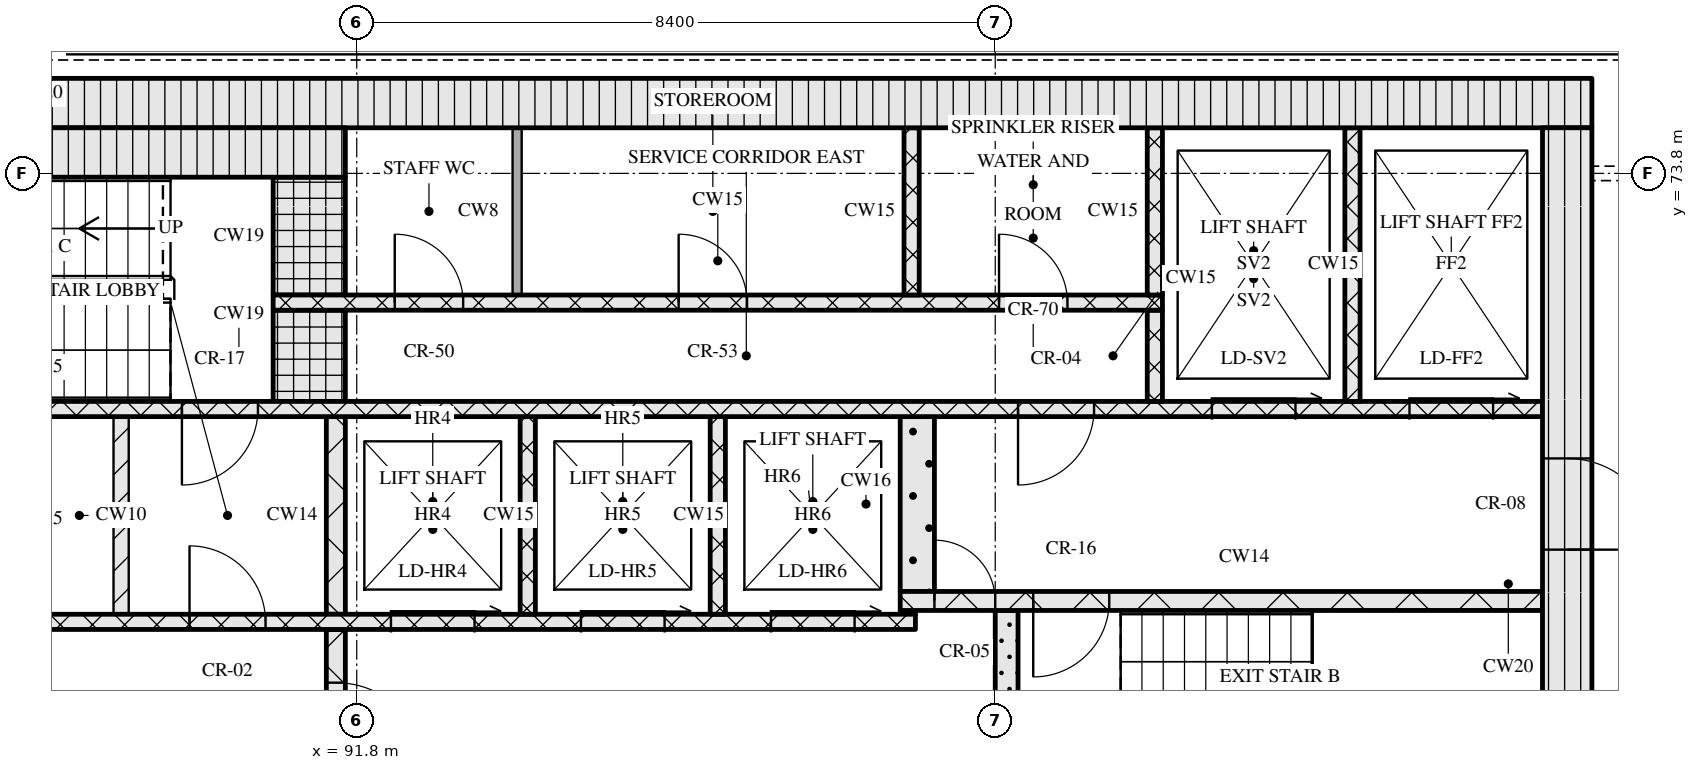
"""IFC4 building model, lengths in metres.
Left out: names, types, materials, properties, quantities, classifications, styles, units other than length and angle.
Written with IfcOpenShell. Run it as: python <this file> out.ifc"""

import sys

from ifc_helpers import new_model, si_unit, direction, frame, frame_2d, origin, place, context, subcontext, project, spatial, rectangle, extrude, element, fill, save


model = new_model("IFC4")
c1 = context("Model", 3, precision=1e-05, world=origin(), true_north=direction((0.0, 1.0)))
c2 = subcontext(c1, "Body", "Model", "MODEL_VIEW")
j1 = project(units=[si_unit("LENGTHUNIT", "METRE"), si_unit("PLANEANGLEUNIT", "RADIAN")], contexts=[c1])
p1 = place(None, origin())
s1 = spatial("IfcSite", under=j1, at=p1, CompositionType="ELEMENT")
p2 = place(p1, origin())
s2 = spatial("IfcBuilding", under=s1, at=p2, CompositionType="ELEMENT")
p3 = place(p2, frame((0.0, 0.0, 216.3)))
s3 = spatial("IfcBuildingStorey", under=s2, at=p3, CompositionType="ELEMENT", Elevation=216.3)
p4 = place(p3, frame((67.15, 74.725, 0.0), z_axis=(0.0, 0.0, 1.0), x_axis=(1.0, 0.0, 0.0)))
e1 = element("IfcWall", 1, at=p4, inside=s3, PredefinedType="SOLIDWALL", context=c2, shape_type="SweptSolid", body=[
    extrude(rectangle(XDim=40.9, YDim=0.65, at=frame_2d((20.45, 0.0))), origin(), (0.0, 0.0, 1.0), 3.32),
])
p5 = place(p3, frame((107.725, 62.4, 0.0), z_axis=(0.0, 0.0, 1.0), x_axis=(0.0, 1.0, 0.0)))
e2 = element("IfcWall", 2, at=p5, inside=s3, PredefinedType="SOLIDWALL", context=c2, shape_type="SweptSolid", body=[
    extrude(rectangle(XDim=12.0, YDim=0.65, at=frame_2d((6.0, 0.0))), origin(), (0.0, 0.0, 1.0), 3.32),
])
p6 = place(p5, frame((6.45, 0.0, 0.0)))
e3 = element("IfcOpeningElement", 3, at=p6, cuts=e2, PredefinedType="OPENING", context=c2, shape_type="SweptSolid", body=[
    extrude(rectangle(XDim=1.2, YDim=2.1, at=frame_2d((0.6, 1.05))), frame((0.0, 0.335, 0.0), z_axis=(0.0, -1.0, 0.0), x_axis=(1.0, 0.0, 0.0)), (0.0, 0.0, 1.0), 0.67),
])
p7 = place(p3, frame((91.525, 65.2, 0.0), z_axis=(0.0, 0.0, 1.0), x_axis=(0.0, 1.0, 0.0)))
e4 = element("IfcWall", 4, at=p7, inside=s3, PredefinedType="SOLIDWALL", context=c2, shape_type="SweptSolid", body=[
    extrude(rectangle(XDim=2.6, YDim=0.25, at=frame_2d((1.3, 0.0))), origin(), (0.0, 0.0, 1.0), 3.32),
])
p8 = place(p7, frame((0.7, 0.0, 0.0)))
e5 = element("IfcOpeningElement", 5, at=p8, cuts=e4, PredefinedType="OPENING", context=c2, shape_type="SweptSolid", body=[
    extrude(rectangle(XDim=1.2, YDim=2.1, at=frame_2d((0.6, 1.05))), frame((0.0, 0.135, 0.0), z_axis=(0.0, -1.0, 0.0), x_axis=(1.0, 0.0, 0.0)), (0.0, 0.0, 1.0), 0.27),
])
p9 = place(p3, frame((100.35, 65.2, 0.0), z_axis=(0.0, 0.0, 1.0), x_axis=(0.0, 1.0, 0.0)))
e6 = element("IfcWall", 6, at=p9, inside=s3, PredefinedType="SOLIDWALL", context=c2, shape_type="SweptSolid", body=[
    extrude(rectangle(XDim=2.85, YDim=0.3, at=frame_2d((1.425, 0.0))), origin(), (0.0, 0.0, 1.0), 3.32),
])
p10 = place(p3, frame((76.05, 67.9, 0.0), z_axis=(0.0, 0.0, 1.0), x_axis=(1.0, 0.0, 0.0)))
e7 = element("IfcWall", 7, at=p10, inside=s3, PredefinedType="SOLIDWALL", context=c2, shape_type="SweptSolid", body=[
    extrude(rectangle(XDim=23.1, YDim=0.2, at=frame_2d((11.55, 0.0))), origin(), (0.0, 0.0, 1.0), 3.32),
])
p11 = place(p10, frame((3.2, 0.0, 0.0)))
e8 = element("IfcOpeningElement", 8, at=p11, cuts=e7, PredefinedType="OPENING", context=c2, shape_type="SweptSolid", body=[
    extrude(rectangle(XDim=0.9, YDim=2.1, at=frame_2d((0.45, 1.05))), frame((0.0, 0.11, 0.0), z_axis=(0.0, -1.0, 0.0), x_axis=(1.0, 0.0, 0.0)), (0.0, 0.0, 1.0), 0.22),
])
p12 = place(p10, frame((9.7, 0.0, 0.0)))
e9 = element("IfcOpeningElement", 9, at=p12, cuts=e7, PredefinedType="OPENING", context=c2, shape_type="SweptSolid", body=[
    extrude(rectangle(XDim=0.9, YDim=2.1, at=frame_2d((0.45, 1.05))), frame((0.0, 0.11, 0.0), z_axis=(0.0, -1.0, 0.0), x_axis=(1.0, 0.0, 0.0)), (0.0, 0.0, 1.0), 0.22),
])
p13 = place(p10, frame((13.55, 0.0, 0.0)))
e10 = element("IfcOpeningElement", 10, at=p13, cuts=e7, PredefinedType="OPENING", context=c2, shape_type="SweptSolid", body=[
    extrude(rectangle(XDim=1.0, YDim=2.1, at=frame_2d((0.5, 1.05))), frame((0.0, 0.11, 0.0), z_axis=(0.0, -1.0, 0.0), x_axis=(1.0, 0.0, 0.0)), (0.0, 0.0, 1.0), 0.22),
])
p14 = place(p10, frame((16.2, 0.0, 0.0)))
e11 = element("IfcOpeningElement", 11, at=p14, cuts=e7, PredefinedType="OPENING", context=c2, shape_type="SweptSolid", body=[
    extrude(rectangle(XDim=1.1, YDim=2.1, at=frame_2d((0.55, 1.05))), frame((0.0, 0.11, 0.0), z_axis=(0.0, -1.0, 0.0), x_axis=(1.0, 0.0, 0.0)), (0.0, 0.0, 1.0), 0.22),
])
p15 = place(p10, frame((18.7, 0.0, 0.0)))
e12 = element("IfcOpeningElement", 12, at=p15, cuts=e7, PredefinedType="OPENING", context=c2, shape_type="SweptSolid", body=[
    extrude(rectangle(XDim=1.1, YDim=2.1, at=frame_2d((0.55, 1.05))), frame((0.0, 0.11, 0.0), z_axis=(0.0, -1.0, 0.0), x_axis=(1.0, 0.0, 0.0)), (0.0, 0.0, 1.0), 0.22),
])
p16 = place(p10, frame((21.2, 0.0, 0.0)))
e13 = element("IfcOpeningElement", 13, at=p16, cuts=e7, PredefinedType="OPENING", context=c2, shape_type="SweptSolid", body=[
    extrude(rectangle(XDim=1.1, YDim=2.1, at=frame_2d((0.55, 1.05))), frame((0.0, 0.11, 0.0), z_axis=(0.0, -1.0, 0.0), x_axis=(1.0, 0.0, 0.0)), (0.0, 0.0, 1.0), 0.22),
])
p17 = place(p3, frame((88.7, 68.0, 0.0), z_axis=(0.0, 0.0, 1.0), x_axis=(0.0, 1.0, 0.0)))
e14 = element("IfcWall", 14, at=p17, inside=s3, PredefinedType="PARTITIONING", context=c2, shape_type="SweptSolid", body=[
    extrude(rectangle(XDim=2.6, YDim=0.2, at=frame_2d((1.3, 0.0))), origin(), (0.0, 0.0, 1.0), 3.32),
])
p18 = place(p3, frame((91.525, 68.0, 0.0), z_axis=(0.0, 0.0, 1.0), x_axis=(0.0, 1.0, 0.0)))
e15 = element("IfcWall", 15, at=p18, inside=s3, PredefinedType="SOLIDWALL", context=c2, shape_type="SweptSolid", body=[
    extrude(rectangle(XDim=2.6, YDim=0.25, at=frame_2d((1.3, 0.0))), origin(), (0.0, 0.0, 1.0), 3.32),
])
for number, where, z_axis, x_axis in (
    (16, (94.05, 68.0, 0.0), (0.0, 0.0, 1.0), (0.0, 1.0, 0.0)),
    (17, (96.55, 68.0, 0.0), (0.0, 0.0, 1.0), (0.0, 1.0, 0.0)),
):
    element("IfcWall", number, at=place(p3, frame(where, z_axis=z_axis, x_axis=x_axis)), inside=s3, PredefinedType="SOLIDWALL", context=c2, shape_type="SweptSolid", body=[
        extrude(rectangle(XDim=2.6, YDim=0.2, at=frame_2d((1.3, 0.0))), origin(), (0.0, 0.0, 1.0), 3.32),
    ])
p19 = place(p3, frame((98.95, 68.025, 0.0), z_axis=(0.0, 0.0, 1.0), x_axis=(1.0, 0.0, 0.0)))
e18 = element("IfcWall", 18, at=p19, inside=s3, PredefinedType="SOLIDWALL", context=c2, shape_type="SweptSolid", body=[
    extrude(rectangle(XDim=0.2, YDim=0.05, at=frame_2d((0.1, 0.0))), origin(), (0.0, 0.0, 1.0), 3.32),
])
p20 = place(p3, frame((98.95, 68.175, 0.0), z_axis=(0.0, 0.0, 1.0), x_axis=(1.0, 0.0, 0.0)))
e19 = element("IfcWall", 19, at=p20, inside=s3, PredefinedType="SOLIDWALL", context=c2, shape_type="SweptSolid", body=[
    extrude(rectangle(XDim=8.45, YDim=0.25, at=frame_2d((4.225, 0.0))), origin(), (0.0, 0.0, 1.0), 3.32),
])
p21 = place(p20, frame((0.45, 0.0, 0.0)))
e20 = element("IfcOpeningElement", 20, at=p21, cuts=e19, PredefinedType="OPENING", context=c2, shape_type="SweptSolid", body=[
    extrude(rectangle(XDim=0.8, YDim=2.1, at=frame_2d((0.4, 1.05))), frame((0.0, 0.135, 0.0), z_axis=(0.0, -1.0, 0.0), x_axis=(1.0, 0.0, 0.0)), (0.0, 0.0, 1.0), 0.27),
])
p22 = place(p20, frame((1.75, 0.0, 0.0)))
e21 = element("IfcOpeningElement", 21, at=p22, cuts=e19, PredefinedType="OPENING", context=c2, shape_type="SweptSolid", body=[
    extrude(rectangle(XDim=1.0, YDim=2.1, at=frame_2d((0.5, 1.05))), frame((0.0, 0.135, 0.0), z_axis=(0.0, -1.0, 0.0), x_axis=(1.0, 0.0, 0.0)), (0.0, 0.0, 1.0), 0.27),
])
p23 = place(p3, frame((99.175, 68.3, 0.0), z_axis=(0.0, 0.0, 1.0), x_axis=(0.0, 1.0, 0.0)))
e22 = element("IfcWall", 22, at=p23, inside=s3, PredefinedType="SOLIDWALL", context=c2, shape_type="SweptSolid", body=[
    extrude(rectangle(XDim=2.3, YDim=0.45, at=frame_2d((1.15, 0.0))), origin(), (0.0, 0.0, 1.0), 3.32),
])
p24 = place(p3, frame((67.8, 70.7, 0.0), z_axis=(0.0, 0.0, 1.0), x_axis=(1.0, 0.0, 0.0)))
e23 = element("IfcWall", 23, at=p24, inside=s3, PredefinedType="SOLIDWALL", context=c2, shape_type="SweptSolid", body=[
    extrude(rectangle(XDim=39.6, YDim=0.2, at=frame_2d((19.8, 0.0))), origin(), (0.0, 0.0, 1.0), 3.32),
])
p25 = place(p24, frame((0.65, 0.0, 0.0)))
e24 = element("IfcOpeningElement", 24, at=p25, cuts=e23, PredefinedType="OPENING", context=c2, shape_type="SweptSolid", body=[
    extrude(rectangle(XDim=1.1, YDim=2.1, at=frame_2d((0.55, 1.05))), frame((0.0, 0.11, 0.0), z_axis=(0.0, -1.0, 0.0), x_axis=(1.0, 0.0, 0.0)), (0.0, 0.0, 1.0), 0.22),
])
p26 = place(p24, frame((3.25, 0.0, 0.0)))
e25 = element("IfcOpeningElement", 25, at=p26, cuts=e23, PredefinedType="OPENING", context=c2, shape_type="SweptSolid", body=[
    extrude(rectangle(XDim=1.1, YDim=2.1, at=frame_2d((0.55, 1.05))), frame((0.0, 0.11, 0.0), z_axis=(0.0, -1.0, 0.0), x_axis=(1.0, 0.0, 0.0)), (0.0, 0.0, 1.0), 0.22),
])
p27 = place(p24, frame((5.9, 0.0, 0.0)))
e26 = element("IfcOpeningElement", 26, at=p27, cuts=e23, PredefinedType="OPENING", context=c2, shape_type="SweptSolid", body=[
    extrude(rectangle(XDim=1.0, YDim=2.1, at=frame_2d((0.5, 1.05))), frame((0.0, 0.11, 0.0), z_axis=(0.0, -1.0, 0.0), x_axis=(1.0, 0.0, 0.0)), (0.0, 0.0, 1.0), 0.22),
])
p28 = place(p24, frame((21.7, 0.0, 0.0)))
e27 = element("IfcOpeningElement", 27, at=p28, cuts=e23, PredefinedType="OPENING", context=c2, shape_type="SweptSolid", body=[
    extrude(rectangle(XDim=1.0, YDim=2.1, at=frame_2d((0.5, 1.05))), frame((0.0, 0.11, 0.0), z_axis=(0.0, -1.0, 0.0), x_axis=(1.0, 0.0, 0.0)), (0.0, 0.0, 1.0), 0.22),
])
p29 = place(p24, frame((32.7, 0.0, 0.0)))
e28 = element("IfcOpeningElement", 28, at=p29, cuts=e23, PredefinedType="OPENING", context=c2, shape_type="SweptSolid", body=[
    extrude(rectangle(XDim=1.0, YDim=2.1, at=frame_2d((0.5, 1.05))), frame((0.0, 0.11, 0.0), z_axis=(0.0, -1.0, 0.0), x_axis=(1.0, 0.0, 0.0)), (0.0, 0.0, 1.0), 0.22),
])
p30 = place(p24, frame((35.25, 0.0, 0.0)))
e29 = element("IfcOpeningElement", 29, at=p30, cuts=e23, PredefinedType="OPENING", context=c2, shape_type="SweptSolid", body=[
    extrude(rectangle(XDim=1.1, YDim=2.1, at=frame_2d((0.55, 1.05))), frame((0.0, 0.11, 0.0), z_axis=(0.0, -1.0, 0.0), x_axis=(1.0, 0.0, 0.0)), (0.0, 0.0, 1.0), 0.22),
])
p31 = place(p24, frame((37.85, 0.0, 0.0)))
e30 = element("IfcOpeningElement", 30, at=p31, cuts=e23, PredefinedType="OPENING", context=c2, shape_type="SweptSolid", body=[
    extrude(rectangle(XDim=1.1, YDim=2.1, at=frame_2d((0.55, 1.05))), frame((0.0, 0.11, 0.0), z_axis=(0.0, -1.0, 0.0), x_axis=(1.0, 0.0, 0.0)), (0.0, 0.0, 1.0), 0.22),
])
p32 = place(p3, frame((91.175, 70.8, 0.0), z_axis=(0.0, 0.0, 1.0), x_axis=(0.0, 1.0, 0.0)))
e31 = element("IfcWall", 31, at=p32, inside=s3, PredefinedType="SOLIDWALL", context=c2, shape_type="SweptSolid", body=[
    extrude(rectangle(XDim=1.2, YDim=0.95, at=frame_2d((0.6, 0.0))), origin(), (0.0, 0.0, 1.0), 3.32),
])
p33 = place(p3, frame((102.3, 70.8, 0.0), z_axis=(0.0, 0.0, 1.0), x_axis=(0.0, 1.0, 0.0)))
e32 = element("IfcWall", 32, at=p33, inside=s3, PredefinedType="SOLIDWALL", context=c2, shape_type="SweptSolid", body=[
    extrude(rectangle(XDim=1.2, YDim=0.2, at=frame_2d((0.6, 0.0))), origin(), (0.0, 0.0, 1.0), 3.32),
])
p34 = place(p3, frame((104.9, 70.8, 0.0), z_axis=(0.0, 0.0, 1.0), x_axis=(0.0, 1.0, 0.0)))
e33 = element("IfcWall", 33, at=p34, inside=s3, PredefinedType="SOLIDWALL", context=c2, shape_type="SweptSolid", body=[
    extrude(rectangle(XDim=3.6, YDim=0.2, at=frame_2d((1.8, 0.0))), origin(), (0.0, 0.0, 1.0), 3.32),
])
p35 = place(p3, frame((90.7, 72.1, 0.0), z_axis=(0.0, 0.0, 1.0), x_axis=(1.0, 0.0, 0.0)))
e34 = element("IfcWall", 34, at=p35, inside=s3, PredefinedType="SOLIDWALL", context=c2, shape_type="SweptSolid", body=[
    extrude(rectangle(XDim=11.7, YDim=0.2, at=frame_2d((5.85, 0.0))), origin(), (0.0, 0.0, 1.0), 3.32),
])
p36 = place(p35, frame((1.6, 0.0, 0.0)))
e35 = element("IfcOpeningElement", 35, at=p36, cuts=e34, PredefinedType="OPENING", context=c2, shape_type="SweptSolid", body=[
    extrude(rectangle(XDim=0.9, YDim=2.1, at=frame_2d((0.45, 1.05))), frame((0.0, 0.11, 0.0), z_axis=(0.0, -1.0, 0.0), x_axis=(1.0, 0.0, 0.0)), (0.0, 0.0, 1.0), 0.22),
])
p37 = place(p35, frame((5.335, 0.0, 0.0)))
e36 = element("IfcOpeningElement", 36, at=p37, cuts=e34, PredefinedType="OPENING", context=c2, shape_type="SweptSolid", body=[
    extrude(rectangle(XDim=0.9, YDim=2.1, at=frame_2d((0.45, 1.05))), frame((0.0, 0.11, 0.0), z_axis=(0.0, -1.0, 0.0), x_axis=(1.0, 0.0, 0.0)), (0.0, 0.0, 1.0), 0.22),
])
p38 = place(p35, frame((9.55, 0.0, 0.0)))
e37 = element("IfcOpeningElement", 37, at=p38, cuts=e34, PredefinedType="OPENING", context=c2, shape_type="SweptSolid", body=[
    extrude(rectangle(XDim=0.9, YDim=2.1, at=frame_2d((0.45, 1.05))), frame((0.0, 0.11, 0.0), z_axis=(0.0, -1.0, 0.0), x_axis=(1.0, 0.0, 0.0)), (0.0, 0.0, 1.0), 0.22),
])
p39 = place(p3, frame((91.175, 72.2, 0.0), z_axis=(0.0, 0.0, 1.0), x_axis=(0.0, 1.0, 0.0)))
e38 = element("IfcWall", 38, at=p39, inside=s3, PredefinedType="SOLIDWALL", context=c2, shape_type="SweptSolid", body=[
    extrude(rectangle(XDim=1.55, YDim=0.95, at=frame_2d((0.775, 0.0))), origin(), (0.0, 0.0, 1.0), 3.32),
])
p40 = place(p3, frame((93.91, 72.2, 0.0), z_axis=(0.0, 0.0, 1.0), x_axis=(0.0, 1.0, 0.0)))
e39 = element("IfcWall", 39, at=p40, inside=s3, PredefinedType="PARTITIONING", context=c2, shape_type="SweptSolid", body=[
    extrude(rectangle(XDim=2.2, YDim=0.12, at=frame_2d((1.1, 0.0))), origin(), (0.0, 0.0, 1.0), 3.32),
])
for number, where, z_axis, x_axis in (
    (40, (99.1, 72.2, 0.0), (0.0, 0.0, 1.0), (0.0, 1.0, 0.0)),
    (41, (102.3, 72.2, 0.0), (0.0, 0.0, 1.0), (0.0, 1.0, 0.0)),
):
    element("IfcWall", number, at=place(p3, frame(where, z_axis=z_axis, x_axis=x_axis)), inside=s3, PredefinedType="SOLIDWALL", context=c2, shape_type="SweptSolid", body=[
        extrude(rectangle(XDim=2.2, YDim=0.2, at=frame_2d((1.1, 0.0))), origin(), (0.0, 0.0, 1.0), 3.32),
    ])
p41 = place(p3, frame((83.55, 74.075, 0.0), z_axis=(0.0, 0.0, 1.0), x_axis=(1.0, 0.0, 0.0)))
e42 = element("IfcWall", 42, at=p41, inside=s3, PredefinedType="SOLIDWALL", context=c2, shape_type="SweptSolid", body=[
    extrude(rectangle(XDim=8.1, YDim=0.65, at=frame_2d((4.05, 0.0))), origin(), (0.0, 0.0, 1.0), 3.32),
])
p42 = place(p8, origin())
e43 = element("IfcDoor", 43, at=p42, inside=s3, OperationType="SINGLE_SWING_RIGHT", PredefinedType="DOOR", context=c2, shape_type="SweptSolid", body=[
    extrude(rectangle(XDim=1.2, YDim=2.1, at=frame_2d((0.6, 1.05))), frame((0.0, 0.025, 0.0), z_axis=(0.0, -1.0, 0.0), x_axis=(1.0, 0.0, 0.0)), (0.0, 0.0, 1.0), 0.05),
])
fill(e5, e43)
p43 = place(p13, origin())
e44 = element("IfcDoor", 44, at=p43, inside=s3, OperationType="SINGLE_SWING_LEFT", PredefinedType="DOOR", context=c2, shape_type="SweptSolid", body=[
    extrude(rectangle(XDim=1.0, YDim=2.1, at=frame_2d((0.5, 1.05))), frame((0.0, 0.025, 0.0), z_axis=(0.0, -1.0, 0.0), x_axis=(1.0, 0.0, 0.0)), (0.0, 0.0, 1.0), 0.05),
])
fill(e10, e44)
p44 = place(p14, origin())
e45 = element("IfcDoor", 45, at=p44, inside=s3, OperationType="SLIDING_TO_RIGHT", PredefinedType="DOOR", context=c2, shape_type="SweptSolid", body=[
    extrude(rectangle(XDim=1.1, YDim=2.1, at=frame_2d((0.55, 1.05))), frame((0.0, 0.025, 0.0), z_axis=(0.0, -1.0, 0.0), x_axis=(1.0, 0.0, 0.0)), (0.0, 0.0, 1.0), 0.05),
])
fill(e11, e45)
p45 = place(p15, origin())
e46 = element("IfcDoor", 46, at=p45, inside=s3, OperationType="SLIDING_TO_RIGHT", PredefinedType="DOOR", context=c2, shape_type="SweptSolid", body=[
    extrude(rectangle(XDim=1.1, YDim=2.1, at=frame_2d((0.55, 1.05))), frame((0.0, 0.025, 0.0), z_axis=(0.0, -1.0, 0.0), x_axis=(1.0, 0.0, 0.0)), (0.0, 0.0, 1.0), 0.05),
])
fill(e12, e46)
p46 = place(p16, origin())
e47 = element("IfcDoor", 47, at=p46, inside=s3, OperationType="SLIDING_TO_RIGHT", PredefinedType="DOOR", context=c2, shape_type="SweptSolid", body=[
    extrude(rectangle(XDim=1.1, YDim=2.1, at=frame_2d((0.55, 1.05))), frame((0.0, 0.025, 0.0), z_axis=(0.0, -1.0, 0.0), x_axis=(1.0, 0.0, 0.0)), (0.0, 0.0, 1.0), 0.05),
])
fill(e13, e47)
p47 = place(p21, origin())
e48 = element("IfcDoor", 48, at=p47, inside=s3, OperationType="SINGLE_SWING_LEFT", PredefinedType="DOOR", context=c2, shape_type="SweptSolid", body=[
    extrude(rectangle(XDim=0.8, YDim=2.1, at=frame_2d((0.4, 1.05))), frame((0.0, 0.025, 0.0), z_axis=(0.0, -1.0, 0.0), x_axis=(1.0, 0.0, 0.0)), (0.0, 0.0, 1.0), 0.05),
])
fill(e20, e48)
p48 = place(p22, origin())
e49 = element("IfcDoor", 49, at=p48, inside=s3, OperationType="SINGLE_SWING_RIGHT", PredefinedType="DOOR", context=c2, shape_type="SweptSolid", body=[
    extrude(rectangle(XDim=1.0, YDim=2.1, at=frame_2d((0.5, 1.05))), frame((0.0, 0.025, 0.0), z_axis=(0.0, -1.0, 0.0), x_axis=(1.0, 0.0, 0.0)), (0.0, 0.0, 1.0), 0.05),
])
fill(e21, e49)
p49 = place(p6, origin())
e50 = element("IfcDoor", 50, at=p49, inside=s3, OperationType="SINGLE_SWING_RIGHT", PredefinedType="DOOR", context=c2, shape_type="SweptSolid", body=[
    extrude(rectangle(XDim=1.2, YDim=2.1, at=frame_2d((0.6, 1.05))), frame((0.0, 0.025, 0.0), z_axis=(0.0, -1.0, 0.0), x_axis=(1.0, 0.0, 0.0)), (0.0, 0.0, 1.0), 0.05),
])
fill(e3, e50)
p50 = place(p28, origin())
e51 = element("IfcDoor", 51, at=p50, inside=s3, OperationType="SINGLE_SWING_RIGHT", PredefinedType="DOOR", context=c2, shape_type="SweptSolid", body=[
    extrude(rectangle(XDim=1.0, YDim=2.1, at=frame_2d((0.5, 1.05))), frame((0.0, 0.025, 0.0), z_axis=(0.0, -1.0, 0.0), x_axis=(1.0, 0.0, 0.0)), (0.0, 0.0, 1.0), 0.05),
])
fill(e27, e51)
p51 = place(p29, origin())
e52 = element("IfcDoor", 52, at=p51, inside=s3, OperationType="SINGLE_SWING_RIGHT", PredefinedType="DOOR", context=c2, shape_type="SweptSolid", body=[
    extrude(rectangle(XDim=1.0, YDim=2.1, at=frame_2d((0.5, 1.05))), frame((0.0, 0.025, 0.0), z_axis=(0.0, -1.0, 0.0), x_axis=(1.0, 0.0, 0.0)), (0.0, 0.0, 1.0), 0.05),
])
fill(e28, e52)
p52 = place(p30, origin())
e53 = element("IfcDoor", 53, at=p52, inside=s3, OperationType="SLIDING_TO_RIGHT", PredefinedType="DOOR", context=c2, shape_type="SweptSolid", body=[
    extrude(rectangle(XDim=1.1, YDim=2.1, at=frame_2d((0.55, 1.05))), frame((0.0, 0.025, 0.0), z_axis=(0.0, -1.0, 0.0), x_axis=(1.0, 0.0, 0.0)), (0.0, 0.0, 1.0), 0.05),
])
fill(e29, e53)
p53 = place(p31, origin())
e54 = element("IfcDoor", 54, at=p53, inside=s3, OperationType="SLIDING_TO_RIGHT", PredefinedType="DOOR", context=c2, shape_type="SweptSolid", body=[
    extrude(rectangle(XDim=1.1, YDim=2.1, at=frame_2d((0.55, 1.05))), frame((0.0, 0.025, 0.0), z_axis=(0.0, -1.0, 0.0), x_axis=(1.0, 0.0, 0.0)), (0.0, 0.0, 1.0), 0.05),
])
fill(e30, e54)
p54 = place(p36, origin())
e55 = element("IfcDoor", 55, at=p54, inside=s3, OperationType="SINGLE_SWING_LEFT", PredefinedType="DOOR", context=c2, shape_type="SweptSolid", body=[
    extrude(rectangle(XDim=0.9, YDim=2.1, at=frame_2d((0.45, 1.05))), frame((0.0, 0.025, 0.0), z_axis=(0.0, -1.0, 0.0), x_axis=(1.0, 0.0, 0.0)), (0.0, 0.0, 1.0), 0.05),
])
fill(e35, e55)
p55 = place(p37, origin())
e56 = element("IfcDoor", 56, at=p55, inside=s3, OperationType="SINGLE_SWING_LEFT", PredefinedType="DOOR", context=c2, shape_type="SweptSolid", body=[
    extrude(rectangle(XDim=0.9, YDim=2.1, at=frame_2d((0.45, 1.05))), frame((0.0, 0.025, 0.0), z_axis=(0.0, -1.0, 0.0), x_axis=(1.0, 0.0, 0.0)), (0.0, 0.0, 1.0), 0.05),
])
fill(e36, e56)
p56 = place(p38, origin())
e57 = element("IfcDoor", 57, at=p56, inside=s3, OperationType="SINGLE_SWING_LEFT", PredefinedType="DOOR", context=c2, shape_type="SweptSolid", body=[
    extrude(rectangle(XDim=0.9, YDim=2.1, at=frame_2d((0.45, 1.05))), frame((0.0, 0.025, 0.0), z_axis=(0.0, -1.0, 0.0), x_axis=(1.0, 0.0, 0.0)), (0.0, 0.0, 1.0), 0.05),
])
fill(e37, e57)
save(model, sys.argv[1])
